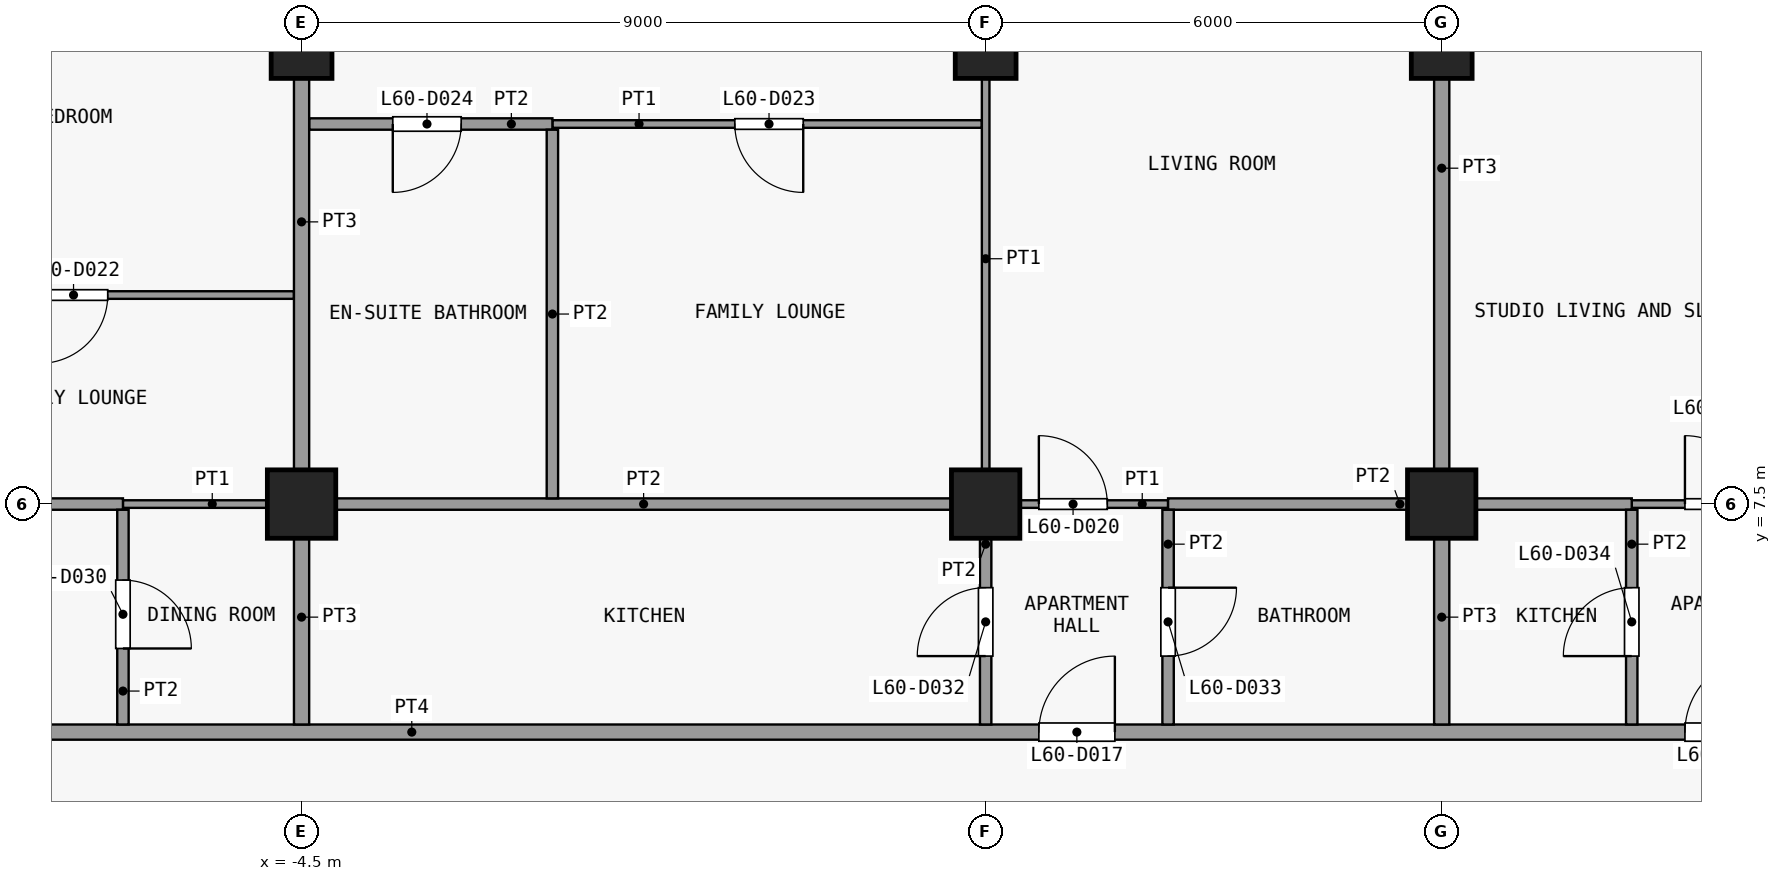
"""IFC4 building model, lengths in metres.
Left out: names, types, materials, properties, quantities, classifications, styles, units other than length and angle.
Written with IfcOpenShell. Run it as: python <this file> out.ifc"""

import sys

from ifc_helpers import new_model, si_unit, direction, frame, frame_2d, origin, origin_2d, place, context, subcontext, project, spatial, rectangle, extrude, element, fill, save


model = new_model("IFC4")
c1 = context("Model", 3, precision=1e-05, world=origin(), true_north=direction((0.0, 1.0)))
c2 = subcontext(c1, "Body", "Model", "MODEL_VIEW")
j1 = project(units=[si_unit("LENGTHUNIT", "METRE"), si_unit("PLANEANGLEUNIT", "RADIAN")], contexts=[c1])
p1 = place(None, origin())
s1 = spatial("IfcSite", under=j1, at=p1, CompositionType="ELEMENT")
p2 = place(p1, origin())
s2 = spatial("IfcBuilding", under=s1, at=p2, CompositionType="ELEMENT")
p3 = place(p2, frame((0.0, 0.0, 237.5)))
s3 = spatial("IfcBuildingStorey", under=s2, at=p3, CompositionType="ELEMENT", Elevation=237.5)
p4 = place(p3, frame((-4.5, 7.5, 0.0), z_axis=(0.0, 0.0, 1.0), x_axis=(1.0, 0.0, 0.0)))
e1 = element("IfcColumn", 1, at=p4, inside=s3, PredefinedType="COLUMN", context=c2, shape_type="SweptSolid", body=[
    extrude(rectangle(XDim=0.9, YDim=0.9, at=origin_2d()), origin(), (0.0, 0.0, 1.0), 3.6),
])
p5 = place(p3, frame((-4.5, 13.5, 0.0), z_axis=(0.0, 0.0, 1.0), x_axis=(1.0, 0.0, 0.0)))
e2 = element("IfcColumn", 2, at=p5, inside=s3, PredefinedType="COLUMN", context=c2, shape_type="SweptSolid", body=[
    extrude(rectangle(XDim=0.8, YDim=0.8, at=origin_2d()), origin(), (0.0, 0.0, 1.0), 3.6),
])
p6 = place(p3, frame((4.5, 7.5, 0.0), z_axis=(0.0, 0.0, 1.0), x_axis=(1.0, 0.0, 0.0)))
e3 = element("IfcColumn", 3, at=p6, inside=s3, PredefinedType="COLUMN", context=c2, shape_type="SweptSolid", body=[
    extrude(rectangle(XDim=0.9, YDim=0.9, at=origin_2d()), origin(), (0.0, 0.0, 1.0), 3.6),
])
p7 = place(p3, frame((4.5, 13.5, 0.0), z_axis=(0.0, 0.0, 1.0), x_axis=(1.0, 0.0, 0.0)))
e4 = element("IfcColumn", 4, at=p7, inside=s3, PredefinedType="COLUMN", context=c2, shape_type="SweptSolid", body=[
    extrude(rectangle(XDim=0.8, YDim=0.8, at=origin_2d()), origin(), (0.0, 0.0, 1.0), 3.6),
])
p8 = place(p3, frame((10.5, 7.5, 0.0), z_axis=(0.0, 0.0, 1.0), x_axis=(1.0, 0.0, 0.0)))
e5 = element("IfcColumn", 5, at=p8, inside=s3, PredefinedType="COLUMN", context=c2, shape_type="SweptSolid", body=[
    extrude(rectangle(XDim=0.9, YDim=0.9, at=origin_2d()), origin(), (0.0, 0.0, 1.0), 3.6),
])
p9 = place(p3, frame((10.5, 13.5, 0.0), z_axis=(0.0, 0.0, 1.0), x_axis=(1.0, 0.0, 0.0)))
e6 = element("IfcColumn", 6, at=p9, inside=s3, PredefinedType="COLUMN", context=c2, shape_type="SweptSolid", body=[
    extrude(rectangle(XDim=0.8, YDim=0.8, at=origin_2d()), origin(), (0.0, 0.0, 1.0), 3.6),
])
p10 = place(p3, frame((-19.35, 4.5, 0.0), z_axis=(0.0, 0.0, 1.0), x_axis=(1.0, 0.0, 0.0)))
e7 = element("IfcWall", 7, at=p10, inside=s3, PredefinedType="PARTITIONING", context=c2, shape_type="SweptSolid", body=[
    extrude(rectangle(XDim=37.2, YDim=0.2, at=frame_2d((18.6, 0.0))), origin(), (0.0, 0.0, 1.0), 3.3),
])
p11 = place(p10, frame((7.05, 0.0, 0.0)))
e8 = element("IfcOpeningElement", 8, at=p11, cuts=e7, PredefinedType="OPENING", context=c2, shape_type="SweptSolid", body=[
    extrude(rectangle(XDim=1.0, YDim=2.1, at=frame_2d((0.5, 1.05))), frame((0.0, 0.11, 0.0), z_axis=(0.0, -1.0, 0.0), x_axis=(1.0, 0.0, 0.0)), (0.0, 0.0, 1.0), 0.22),
])
p12 = place(p10, frame((24.55, 0.0, 0.0)))
e9 = element("IfcOpeningElement", 9, at=p12, cuts=e7, PredefinedType="OPENING", context=c2, shape_type="SweptSolid", body=[
    extrude(rectangle(XDim=1.0, YDim=2.1, at=frame_2d((0.5, 1.05))), frame((0.0, 0.11, 0.0), z_axis=(0.0, -1.0, 0.0), x_axis=(1.0, 0.0, 0.0)), (0.0, 0.0, 1.0), 0.22),
])
p13 = place(p10, frame((33.05, 0.0, 0.0)))
e10 = element("IfcOpeningElement", 10, at=p13, cuts=e7, PredefinedType="OPENING", context=c2, shape_type="SweptSolid", body=[
    extrude(rectangle(XDim=1.0, YDim=2.1, at=frame_2d((0.5, 1.05))), frame((0.0, 0.11, 0.0), z_axis=(0.0, -1.0, 0.0), x_axis=(1.0, 0.0, 0.0)), (0.0, 0.0, 1.0), 0.22),
])
p14 = place(p3, frame((-6.85, 7.5, 0.0), z_axis=(0.0, 0.0, 1.0), x_axis=(1.0, 0.0, 0.0)))
e11 = element("IfcWall", 11, at=p14, inside=s3, PredefinedType="PARTITIONING", context=c2, shape_type="SweptSolid", body=[
    extrude(rectangle(XDim=2.35, YDim=0.1, at=frame_2d((1.175, 0.0))), origin(), (0.0, 0.0, 1.0), 3.3),
])
p15 = place(p3, frame((4.5, 7.5, 0.0), z_axis=(0.0, 0.0, 1.0), x_axis=(1.0, 0.0, 0.0)))
e12 = element("IfcWall", 12, at=p15, inside=s3, PredefinedType="PARTITIONING", context=c2, shape_type="SweptSolid", body=[
    extrude(rectangle(XDim=2.4, YDim=0.1, at=frame_2d((1.2, 0.0))), origin(), (0.0, 0.0, 1.0), 3.3),
])
p16 = place(p15, frame((0.7, 0.0, 0.0)))
e13 = element("IfcOpeningElement", 13, at=p16, cuts=e12, PredefinedType="OPENING", context=c2, shape_type="SweptSolid", body=[
    extrude(rectangle(XDim=0.9, YDim=2.1, at=frame_2d((0.45, 1.05))), frame((0.0, 0.06, 0.0), z_axis=(0.0, -1.0, 0.0), x_axis=(1.0, 0.0, 0.0)), (0.0, 0.0, 1.0), 0.12),
])
p17 = place(p3, frame((13.0, 7.5, 0.0), z_axis=(0.0, 0.0, 1.0), x_axis=(1.0, 0.0, 0.0)))
e14 = element("IfcWall", 14, at=p17, inside=s3, PredefinedType="PARTITIONING", context=c2, shape_type="SweptSolid", body=[
    extrude(rectangle(XDim=2.4, YDim=0.1, at=frame_2d((1.2, 0.0))), origin(), (0.0, 0.0, 1.0), 3.3),
])
p18 = place(p17, frame((0.7, 0.0, 0.0)))
e15 = element("IfcOpeningElement", 15, at=p18, cuts=e14, PredefinedType="OPENING", context=c2, shape_type="SweptSolid", body=[
    extrude(rectangle(XDim=0.9, YDim=2.1, at=frame_2d((0.45, 1.05))), frame((0.0, 0.06, 0.0), z_axis=(0.0, -1.0, 0.0), x_axis=(1.0, 0.0, 0.0)), (0.0, 0.0, 1.0), 0.12),
])
p19 = place(p3, frame((-10.5, 7.5, 0.0), z_axis=(0.0, 0.0, 1.0), x_axis=(1.0, 0.0, 0.0)))
e16 = element("IfcWall", 16, at=p19, inside=s3, PredefinedType="PARTITIONING", context=c2, shape_type="SweptSolid", body=[
    extrude(rectangle(XDim=3.65, YDim=0.15, at=frame_2d((1.825, 0.0))), origin(), (0.0, 0.0, 1.0), 3.3),
])
p20 = place(p3, frame((-4.5, 7.5, 0.0), z_axis=(0.0, 0.0, 1.0), x_axis=(1.0, 0.0, 0.0)))
e17 = element("IfcWall", 17, at=p20, inside=s3, PredefinedType="PARTITIONING", context=c2, shape_type="SweptSolid", body=[
    extrude(rectangle(XDim=9.0, YDim=0.15, at=frame_2d((4.5, 0.0))), origin(), (0.0, 0.0, 1.0), 3.3),
])
p21 = place(p3, frame((6.9, 7.5, 0.0), z_axis=(0.0, 0.0, 1.0), x_axis=(1.0, 0.0, 0.0)))
e18 = element("IfcWall", 18, at=p21, inside=s3, PredefinedType="PARTITIONING", context=c2, shape_type="SweptSolid", body=[
    extrude(rectangle(XDim=6.1, YDim=0.15, at=frame_2d((3.05, 0.0))), origin(), (0.0, 0.0, 1.0), 3.3),
])
p22 = place(p3, frame((-10.45, 10.25, 0.0), z_axis=(0.0, 0.0, 1.0), x_axis=(1.0, 0.0, 0.0)))
e19 = element("IfcWall", 19, at=p22, inside=s3, PredefinedType="PARTITIONING", context=c2, shape_type="SweptSolid", body=[
    extrude(rectangle(XDim=5.85, YDim=0.1, at=frame_2d((2.925, 0.0))), origin(), (0.0, 0.0, 1.0), 3.3),
])
p23 = place(p22, frame((2.5, 0.0, 0.0)))
e20 = element("IfcOpeningElement", 20, at=p23, cuts=e19, PredefinedType="OPENING", context=c2, shape_type="SweptSolid", body=[
    extrude(rectangle(XDim=0.9, YDim=2.1, at=frame_2d((0.45, 1.05))), frame((0.0, 0.06, 0.0), z_axis=(0.0, -1.0, 0.0), x_axis=(1.0, 0.0, 0.0)), (0.0, 0.0, 1.0), 0.12),
])
p24 = place(p3, frame((-1.2, 12.5, 0.0), z_axis=(0.0, 0.0, 1.0), x_axis=(1.0, 0.0, 0.0)))
e21 = element("IfcWall", 21, at=p24, inside=s3, PredefinedType="PARTITIONING", context=c2, shape_type="SweptSolid", body=[
    extrude(rectangle(XDim=5.65, YDim=0.1, at=frame_2d((2.825, 0.0))), origin(), (0.0, 0.0, 1.0), 3.3),
])
p25 = place(p24, frame((2.4, 0.0, 0.0)))
e22 = element("IfcOpeningElement", 22, at=p25, cuts=e21, PredefinedType="OPENING", context=c2, shape_type="SweptSolid", body=[
    extrude(rectangle(XDim=0.9, YDim=2.1, at=frame_2d((0.45, 1.05))), frame((0.0, 0.06, 0.0), z_axis=(0.0, -1.0, 0.0), x_axis=(1.0, 0.0, 0.0)), (0.0, 0.0, 1.0), 0.12),
])
p26 = place(p3, frame((-4.4, 12.5, 0.0), z_axis=(0.0, 0.0, 1.0), x_axis=(1.0, 0.0, 0.0)))
e23 = element("IfcWall", 23, at=p26, inside=s3, PredefinedType="PARTITIONING", context=c2, shape_type="SweptSolid", body=[
    extrude(rectangle(XDim=3.2, YDim=0.15, at=frame_2d((1.6, 0.0))), origin(), (0.0, 0.0, 1.0), 3.3),
])
p27 = place(p26, frame((1.1, 0.0, 0.0)))
e24 = element("IfcOpeningElement", 24, at=p27, cuts=e23, PredefinedType="OPENING", context=c2, shape_type="SweptSolid", body=[
    extrude(rectangle(XDim=0.9, YDim=2.1, at=frame_2d((0.45, 1.05))), frame((0.0, 0.085, 0.0), z_axis=(0.0, -1.0, 0.0), x_axis=(1.0, 0.0, 0.0)), (0.0, 0.0, 1.0), 0.17),
])
p28 = place(p3, frame((-6.85, 4.6, 0.0), z_axis=(0.0, 0.0, 1.0), x_axis=(0.0, 1.0, 0.0)))
e25 = element("IfcWall", 25, at=p28, inside=s3, PredefinedType="PARTITIONING", context=c2, shape_type="SweptSolid", body=[
    extrude(rectangle(XDim=2.825, YDim=0.15, at=frame_2d((1.413, 0.0))), origin(), (0.0, 0.0, 1.0), 3.3),
])
p29 = place(p28, frame((1.0, 0.0, 0.0)))
e26 = element("IfcOpeningElement", 26, at=p29, cuts=e25, PredefinedType="OPENING", context=c2, shape_type="SweptSolid", body=[
    extrude(rectangle(XDim=0.9, YDim=2.1, at=frame_2d((0.45, 1.05))), frame((0.0, 0.085, 0.0), z_axis=(0.0, -1.0, 0.0), x_axis=(1.0, 0.0, 0.0)), (0.0, 0.0, 1.0), 0.17),
])
p30 = place(p3, frame((-4.5, 4.6, 0.0), z_axis=(0.0, 0.0, 1.0), x_axis=(0.0, 1.0, 0.0)))
e27 = element("IfcWall", 27, at=p30, inside=s3, PredefinedType="PARTITIONING", context=c2, shape_type="SweptSolid", body=[
    extrude(rectangle(XDim=2.825, YDim=0.2, at=frame_2d((1.413, 0.0))), origin(), (0.0, 0.0, 1.0), 3.3),
])
p31 = place(p3, frame((-4.5, 7.575, 0.0), z_axis=(0.0, 0.0, 1.0), x_axis=(0.0, 1.0, 0.0)))
e28 = element("IfcWall", 28, at=p31, inside=s3, PredefinedType="PARTITIONING", context=c2, shape_type="SweptSolid", body=[
    extrude(rectangle(XDim=7.275, YDim=0.2, at=frame_2d((3.638, 0.0))), origin(), (0.0, 0.0, 1.0), 3.3),
])
p32 = place(p3, frame((-1.2, 7.575, 0.0), z_axis=(0.0, 0.0, 1.0), x_axis=(0.0, 1.0, 0.0)))
e29 = element("IfcWall", 29, at=p32, inside=s3, PredefinedType="PARTITIONING", context=c2, shape_type="SweptSolid", body=[
    extrude(rectangle(XDim=4.85, YDim=0.15, at=frame_2d((2.425, 0.0))), origin(), (0.0, 0.0, 1.0), 3.3),
])
p33 = place(p3, frame((4.5, 7.575, 0.0), z_axis=(0.0, 0.0, 1.0), x_axis=(0.0, 1.0, 0.0)))
e30 = element("IfcWall", 30, at=p33, inside=s3, PredefinedType="PARTITIONING", context=c2, shape_type="SweptSolid", body=[
    extrude(rectangle(XDim=8.688, YDim=0.1, at=frame_2d((4.344, 0.0))), origin(), (0.0, 0.0, 1.0), 3.3),
])
p34 = place(p33, frame((6.425, 0.0, 0.0)))
e31 = element("IfcOpeningElement", 31, at=p34, cuts=e30, PredefinedType="OPENING", context=c2, shape_type="SweptSolid", body=[
    extrude(rectangle(XDim=0.9, YDim=2.1, at=frame_2d((0.45, 1.05))), frame((0.0, 0.06, 0.0), z_axis=(0.0, -1.0, 0.0), x_axis=(1.0, 0.0, 0.0)), (0.0, 0.0, 1.0), 0.12),
])
p35 = place(p3, frame((4.5, 4.6, 0.0), z_axis=(0.0, 0.0, 1.0), x_axis=(0.0, 1.0, 0.0)))
e32 = element("IfcWall", 32, at=p35, inside=s3, PredefinedType="PARTITIONING", context=c2, shape_type="SweptSolid", body=[
    extrude(rectangle(XDim=2.825, YDim=0.15, at=frame_2d((1.413, 0.0))), origin(), (0.0, 0.0, 1.0), 3.3),
])
p36 = place(p35, frame((0.9, 0.0, 0.0)))
e33 = element("IfcOpeningElement", 33, at=p36, cuts=e32, PredefinedType="OPENING", context=c2, shape_type="SweptSolid", body=[
    extrude(rectangle(XDim=0.9, YDim=2.1, at=frame_2d((0.45, 1.05))), frame((0.0, 0.085, 0.0), z_axis=(0.0, -1.0, 0.0), x_axis=(1.0, 0.0, 0.0)), (0.0, 0.0, 1.0), 0.17),
])
p37 = place(p3, frame((6.9, 4.6, 0.0), z_axis=(0.0, 0.0, 1.0), x_axis=(0.0, 1.0, 0.0)))
e34 = element("IfcWall", 34, at=p37, inside=s3, PredefinedType="PARTITIONING", context=c2, shape_type="SweptSolid", body=[
    extrude(rectangle(XDim=2.825, YDim=0.15, at=frame_2d((1.413, 0.0))), origin(), (0.0, 0.0, 1.0), 3.3),
])
p38 = place(p37, frame((0.9, 0.0, 0.0)))
e35 = element("IfcOpeningElement", 35, at=p38, cuts=e34, PredefinedType="OPENING", context=c2, shape_type="SweptSolid", body=[
    extrude(rectangle(XDim=0.9, YDim=2.1, at=frame_2d((0.45, 1.05))), frame((0.0, 0.085, 0.0), z_axis=(0.0, -1.0, 0.0), x_axis=(1.0, 0.0, 0.0)), (0.0, 0.0, 1.0), 0.17),
])
p39 = place(p3, frame((10.5, 4.6, 0.0), z_axis=(0.0, 0.0, 1.0), x_axis=(0.0, 1.0, 0.0)))
e36 = element("IfcWall", 36, at=p39, inside=s3, PredefinedType="PARTITIONING", context=c2, shape_type="SweptSolid", body=[
    extrude(rectangle(XDim=2.825, YDim=0.2, at=frame_2d((1.413, 0.0))), origin(), (0.0, 0.0, 1.0), 3.3),
])
p40 = place(p3, frame((10.5, 7.575, 0.0), z_axis=(0.0, 0.0, 1.0), x_axis=(0.0, 1.0, 0.0)))
e37 = element("IfcWall", 37, at=p40, inside=s3, PredefinedType="PARTITIONING", context=c2, shape_type="SweptSolid", body=[
    extrude(rectangle(XDim=8.688, YDim=0.2, at=frame_2d((4.344, 0.0))), origin(), (0.0, 0.0, 1.0), 3.3),
])
p41 = place(p3, frame((13.0, 4.6, 0.0), z_axis=(0.0, 0.0, 1.0), x_axis=(0.0, 1.0, 0.0)))
e38 = element("IfcWall", 38, at=p41, inside=s3, PredefinedType="PARTITIONING", context=c2, shape_type="SweptSolid", body=[
    extrude(rectangle(XDim=2.825, YDim=0.15, at=frame_2d((1.413, 0.0))), origin(), (0.0, 0.0, 1.0), 3.3),
])
p42 = place(p41, frame((0.9, 0.0, 0.0)))
e39 = element("IfcOpeningElement", 39, at=p42, cuts=e38, PredefinedType="OPENING", context=c2, shape_type="SweptSolid", body=[
    extrude(rectangle(XDim=0.9, YDim=2.1, at=frame_2d((0.45, 1.05))), frame((0.0, 0.085, 0.0), z_axis=(0.0, -1.0, 0.0), x_axis=(1.0, 0.0, 0.0)), (0.0, 0.0, 1.0), 0.17),
])
p43 = place(p12, origin())
e40 = element("IfcDoor", 40, at=p43, inside=s3, OperationType="SINGLE_SWING_LEFT", PredefinedType="DOOR", context=c2, shape_type="SweptSolid", body=[
    extrude(rectangle(XDim=1.0, YDim=2.1, at=frame_2d((0.5, 1.05))), frame((0.0, 0.025, 0.0), z_axis=(0.0, -1.0, 0.0), x_axis=(1.0, 0.0, 0.0)), (0.0, 0.0, 1.0), 0.05),
])
fill(e9, e40)
p44 = place(p13, origin())
e41 = element("IfcDoor", 41, at=p44, inside=s3, OperationType="SINGLE_SWING_LEFT", PredefinedType="DOOR", context=c2, shape_type="SweptSolid", body=[
    extrude(rectangle(XDim=1.0, YDim=2.1, at=frame_2d((0.5, 1.05))), frame((0.0, 0.025, 0.0), z_axis=(0.0, -1.0, 0.0), x_axis=(1.0, 0.0, 0.0)), (0.0, 0.0, 1.0), 0.05),
])
fill(e10, e41)
p45 = place(p16, origin())
e42 = element("IfcDoor", 42, at=p45, inside=s3, OperationType="SINGLE_SWING_RIGHT", PredefinedType="DOOR", context=c2, shape_type="SweptSolid", body=[
    extrude(rectangle(XDim=0.9, YDim=2.1, at=frame_2d((0.45, 1.05))), frame((0.0, 0.025, 0.0), z_axis=(0.0, -1.0, 0.0), x_axis=(1.0, 0.0, 0.0)), (0.0, 0.0, 1.0), 0.05),
])
fill(e13, e42)
p46 = place(p18, origin())
e43 = element("IfcDoor", 43, at=p46, inside=s3, OperationType="SINGLE_SWING_RIGHT", PredefinedType="DOOR", context=c2, shape_type="SweptSolid", body=[
    extrude(rectangle(XDim=0.9, YDim=2.1, at=frame_2d((0.45, 1.05))), frame((0.0, 0.025, 0.0), z_axis=(0.0, -1.0, 0.0), x_axis=(1.0, 0.0, 0.0)), (0.0, 0.0, 1.0), 0.05),
])
fill(e15, e43)
p47 = place(p23, origin())
e44 = element("IfcDoor", 44, at=p47, inside=s3, OperationType="SINGLE_SWING_LEFT", PredefinedType="DOOR", context=c2, shape_type="SweptSolid", body=[
    extrude(rectangle(XDim=0.9, YDim=2.1, at=frame_2d((0.45, 1.05))), frame((0.0, 0.025, 0.0), z_axis=(0.0, -1.0, 0.0), x_axis=(1.0, 0.0, 0.0)), (0.0, 0.0, 1.0), 0.05),
])
fill(e20, e44)
p48 = place(p25, origin())
e45 = element("IfcDoor", 45, at=p48, inside=s3, OperationType="SINGLE_SWING_RIGHT", PredefinedType="DOOR", context=c2, shape_type="SweptSolid", body=[
    extrude(rectangle(XDim=0.9, YDim=2.1, at=frame_2d((0.45, 1.05))), frame((0.0, 0.025, 0.0), z_axis=(0.0, -1.0, 0.0), x_axis=(1.0, 0.0, 0.0)), (0.0, 0.0, 1.0), 0.05),
])
fill(e22, e45)
p49 = place(p27, origin())
e46 = element("IfcDoor", 46, at=p49, inside=s3, OperationType="SINGLE_SWING_LEFT", PredefinedType="DOOR", context=c2, shape_type="SweptSolid", body=[
    extrude(rectangle(XDim=0.9, YDim=2.1, at=frame_2d((0.45, 1.05))), frame((0.0, 0.025, 0.0), z_axis=(0.0, -1.0, 0.0), x_axis=(1.0, 0.0, 0.0)), (0.0, 0.0, 1.0), 0.05),
])
fill(e24, e46)
p50 = place(p29, origin())
e47 = element("IfcDoor", 47, at=p50, inside=s3, OperationType="SINGLE_SWING_LEFT", PredefinedType="DOOR", context=c2, shape_type="SweptSolid", body=[
    extrude(rectangle(XDim=0.9, YDim=2.1, at=frame_2d((0.45, 1.05))), frame((0.0, 0.025, 0.0), z_axis=(0.0, -1.0, 0.0), x_axis=(1.0, 0.0, 0.0)), (0.0, 0.0, 1.0), 0.05),
])
fill(e26, e47)
p51 = place(p36, origin())
e48 = element("IfcDoor", 48, at=p51, inside=s3, OperationType="SINGLE_SWING_RIGHT", PredefinedType="DOOR", context=c2, shape_type="SweptSolid", body=[
    extrude(rectangle(XDim=0.9, YDim=2.1, at=frame_2d((0.45, 1.05))), frame((0.0, 0.025, 0.0), z_axis=(0.0, -1.0, 0.0), x_axis=(1.0, 0.0, 0.0)), (0.0, 0.0, 1.0), 0.05),
])
fill(e33, e48)
p52 = place(p38, origin())
e49 = element("IfcDoor", 49, at=p52, inside=s3, OperationType="SINGLE_SWING_RIGHT", PredefinedType="DOOR", context=c2, shape_type="SweptSolid", body=[
    extrude(rectangle(XDim=0.9, YDim=2.1, at=frame_2d((0.45, 1.05))), frame((0.0, 0.025, 0.0), z_axis=(0.0, -1.0, 0.0), x_axis=(1.0, 0.0, 0.0)), (0.0, 0.0, 1.0), 0.05),
])
fill(e35, e49)
p53 = place(p42, origin())
e50 = element("IfcDoor", 50, at=p53, inside=s3, OperationType="SINGLE_SWING_RIGHT", PredefinedType="DOOR", context=c2, shape_type="SweptSolid", body=[
    extrude(rectangle(XDim=0.9, YDim=2.1, at=frame_2d((0.45, 1.05))), frame((0.0, 0.025, 0.0), z_axis=(0.0, -1.0, 0.0), x_axis=(1.0, 0.0, 0.0)), (0.0, 0.0, 1.0), 0.05),
])
fill(e39, e50)
save(model, sys.argv[1])
